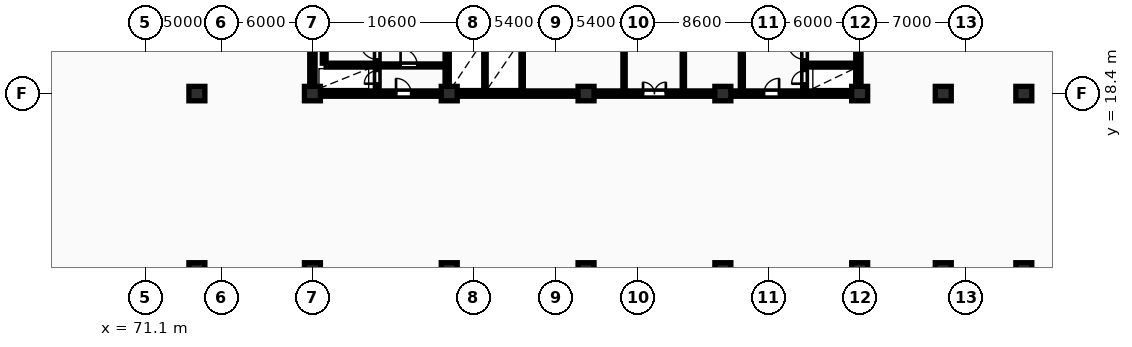
"""IFC4 building model, lengths in metres.
Left out: names, types, materials, properties, quantities, classifications, styles, units other than length and angle.
Written with IfcOpenShell. Run it as: python <this file> out.ifc"""

import sys

from ifc_helpers import new_model, si_unit, direction, frame, frame_2d, origin, origin_2d, place, context, subcontext, project, spatial, rectangle, extrude, element, fill, save


model = new_model("IFC4")
c1 = context("Model", 3, precision=1e-05, world=origin(), true_north=direction((0.0, 1.0)))
c2 = subcontext(c1, "Body", "Model", "MODEL_VIEW")
j1 = project(units=[si_unit("LENGTHUNIT", "METRE"), si_unit("PLANEANGLEUNIT", "RADIAN")], contexts=[c1])
p1 = place(None, origin())
s1 = spatial("IfcSite", under=j1, at=p1, CompositionType="ELEMENT")
p2 = place(p1, origin())
s2 = spatial("IfcBuilding", under=s1, at=p2, CompositionType="ELEMENT")
p3 = place(p2, frame((0.0, 0.0, -3.6)))
s3 = spatial("IfcBuildingStorey", under=s2, at=p3, CompositionType="ELEMENT", Elevation=-3.6)
for number, where, z_axis, x_axis in (
    (1, (74.5, 6.8, 0.0), (0.0, 0.0, 1.0), (1.0, 0.0, 0.0)),
    (2, (74.5, 18.4, 0.0), (0.0, 0.0, 1.0), (1.0, 0.0, 0.0)),
    (3, (82.1, 6.8, 0.0), (0.0, 0.0, 1.0), (1.0, 0.0, 0.0)),
    (4, (82.1, 18.4, 0.0), (0.0, 0.0, 1.0), (1.0, 0.0, 0.0)),
    (5, (91.1, 6.8, 0.0), (0.0, 0.0, 1.0), (1.0, 0.0, 0.0)),
    (6, (91.1, 18.4, 0.0), (0.0, 0.0, 1.0), (1.0, 0.0, 0.0)),
    (7, (100.1, 6.8, 0.0), (0.0, 0.0, 1.0), (1.0, 0.0, 0.0)),
    (8, (100.1, 18.4, 0.0), (0.0, 0.0, 1.0), (1.0, 0.0, 0.0)),
    (9, (109.1, 6.8, 0.0), (0.0, 0.0, 1.0), (1.0, 0.0, 0.0)),
    (10, (109.1, 18.4, 0.0), (0.0, 0.0, 1.0), (1.0, 0.0, 0.0)),
    (11, (118.1, 6.8, 0.0), (0.0, 0.0, 1.0), (1.0, 0.0, 0.0)),
    (12, (118.1, 18.4, 0.0), (0.0, 0.0, 1.0), (1.0, 0.0, 0.0)),
    (13, (123.6, 6.8, 0.0), (0.0, 0.0, 1.0), (1.0, 0.0, 0.0)),
    (14, (123.6, 18.4, 0.0), (0.0, 0.0, 1.0), (1.0, 0.0, 0.0)),
    (15, (128.9, 6.8, 0.0), (0.0, 0.0, 1.0), (1.0, 0.0, 0.0)),
    (16, (128.9, 18.4, 0.0), (0.0, 0.0, 1.0), (1.0, 0.0, 0.0)),
):
    element("IfcColumn", number, at=place(p3, frame(where, z_axis=z_axis, x_axis=x_axis)), inside=s3, PredefinedType="COLUMN", context=c2, shape_type="SweptSolid", body=[
        extrude(rectangle(XDim=1.05, YDim=0.95, at=origin_2d()), origin(), (0.0, 0.0, 1.0), 3.6),
    ])
for number, where, z_axis, x_axis in (
    (17, (82.1, 18.575, 0.0), (0.0, 0.0, 1.0), (0.0, 1.0, 0.0)),
    (18, (118.015, 18.575, 0.0), (0.0, 0.0, 1.0), (0.0, 1.0, 0.0)),
):
    element("IfcWall", number, at=place(p3, frame(where, z_axis=z_axis, x_axis=x_axis)), inside=s3, PredefinedType="SHEAR", context=c2, shape_type="SweptSolid", body=[
        extrude(rectangle(XDim=11.65, YDim=0.35, at=frame_2d((5.825, 0.0))), origin(), (0.0, 0.0, 1.0), 3.6),
    ])
p4 = place(p3, frame((81.925, 18.4, 0.0), z_axis=(0.0, 0.0, 1.0), x_axis=(1.0, 0.0, 0.0)))
e19 = element("IfcWall", 19, at=p4, inside=s3, PredefinedType="SHEAR", context=c2, shape_type="SweptSolid", body=[
    extrude(rectangle(XDim=36.265, YDim=0.35, at=frame_2d((18.132, 0.0))), origin(), (0.0, 0.0, 1.0), 3.6),
])
p5 = place(p4, frame((5.675, 0.0, 0.0)))
e20 = element("IfcOpeningElement", 20, at=p5, cuts=e19, PredefinedType="OPENING", context=c2, shape_type="SweptSolid", body=[
    extrude(rectangle(XDim=1.0, YDim=2.15, at=frame_2d((0.5, 1.075))), frame((0.0, 0.185, 0.0), z_axis=(0.0, -1.0, 0.0), x_axis=(1.0, 0.0, 0.0)), (0.0, 0.0, 1.0), 0.37),
])
p6 = place(p4, frame((21.925, 0.0, 0.0)))
e21 = element("IfcOpeningElement", 21, at=p6, cuts=e19, PredefinedType="OPENING", context=c2, shape_type="SweptSolid", body=[
    extrude(rectangle(XDim=1.5, YDim=2.2, at=frame_2d((0.75, 1.1))), frame((0.0, 0.185, 0.0), z_axis=(0.0, -1.0, 0.0), x_axis=(1.0, 0.0, 0.0)), (0.0, 0.0, 1.0), 0.37),
])
p7 = place(p4, frame((29.875, 0.0, 0.0)))
e22 = element("IfcOpeningElement", 22, at=p7, cuts=e19, PredefinedType="OPENING", context=c2, shape_type="SweptSolid", body=[
    extrude(rectangle(XDim=1.0, YDim=2.15, at=frame_2d((0.5, 1.075))), frame((0.0, 0.185, 0.0), z_axis=(0.0, -1.0, 0.0), x_axis=(1.0, 0.0, 0.0)), (0.0, 0.0, 1.0), 0.37),
])
p8 = place(p3, frame((82.875, 20.4, 0.0), z_axis=(0.0, 0.0, 1.0), x_axis=(0.0, 1.0, 0.0)))
e23 = element("IfcWall", 23, at=p8, inside=s3, PredefinedType="SHEAR", context=c2, shape_type="SweptSolid", body=[
    extrude(rectangle(XDim=7.6, YDim=0.25, at=frame_2d((3.8, 0.0))), origin(), (0.0, 0.0, 1.0), 3.6),
])
p9 = place(p3, frame((86.365, 18.6, 0.0), z_axis=(0.0, 0.0, 1.0), x_axis=(0.0, 1.0, 0.0)))
e24 = element("IfcWall", 24, at=p9, inside=s3, PredefinedType="SHEAR", context=c2, shape_type="SweptSolid", body=[
    extrude(rectangle(XDim=11.6, YDim=0.25, at=frame_2d((5.8, 0.0))), origin(), (0.0, 0.0, 1.0), 3.6),
])
p10 = place(p9, frame((0.45, 0.0, 0.0)))
e25 = element("IfcOpeningElement", 25, at=p10, cuts=e24, PredefinedType="OPENING", context=c2, shape_type="SweptSolid", body=[
    extrude(rectangle(XDim=0.85, YDim=2.05, at=frame_2d((0.425, 1.025))), frame((0.0, 0.135, 0.0), z_axis=(0.0, -1.0, 0.0), x_axis=(1.0, 0.0, 0.0)), (0.0, 0.0, 1.0), 0.27),
])
p11 = place(p9, frame((2.05, 0.0, 0.0)))
e26 = element("IfcOpeningElement", 26, at=p11, cuts=e24, PredefinedType="OPENING", context=c2, shape_type="SweptSolid", body=[
    extrude(rectangle(XDim=1.1, YDim=2.1, at=frame_2d((0.55, 1.05))), frame((0.0, 0.135, 0.0), z_axis=(0.0, -1.0, 0.0), x_axis=(1.0, 0.0, 0.0)), (0.0, 0.0, 1.0), 0.27),
])
p12 = place(p9, frame((9.95, 0.0, 0.0)))
e27 = element("IfcOpeningElement", 27, at=p12, cuts=e24, PredefinedType="OPENING", context=c2, shape_type="SweptSolid", body=[
    extrude(rectangle(XDim=0.85, YDim=2.05, at=frame_2d((0.425, 1.025))), frame((0.0, 0.135, 0.0), z_axis=(0.0, -1.0, 0.0), x_axis=(1.0, 0.0, 0.0)), (0.0, 0.0, 1.0), 0.27),
])
p13 = place(p3, frame((83.0, 20.275, 0.0), z_axis=(0.0, 0.0, 1.0), x_axis=(1.0, 0.0, 0.0)))
e28 = element("IfcWall", 28, at=p13, inside=s3, PredefinedType="SHEAR", context=c2, shape_type="SweptSolid", body=[
    extrude(rectangle(XDim=3.24, YDim=0.25, at=frame_2d((1.62, 0.0))), origin(), (0.0, 0.0, 1.0), 3.6),
])
p14 = place(p3, frame((86.5, 20.25, 0.0), z_axis=(0.0, 0.0, 1.0), x_axis=(1.0, 0.0, 0.0)))
e29 = element("IfcWall", 29, at=p14, inside=s3, PredefinedType="PARTITIONING", context=c2, shape_type="SweptSolid", body=[
    extrude(rectangle(XDim=4.32, YDim=0.2, at=frame_2d((2.16, 0.0))), origin(), (0.0, 0.0, 1.0), 3.3),
])
p15 = place(p14, frame((1.4, 0.0, 0.0)))
e30 = element("IfcOpeningElement", 30, at=p15, cuts=e29, PredefinedType="OPENING", context=c2, shape_type="SweptSolid", body=[
    extrude(rectangle(XDim=1.1, YDim=2.1, at=frame_2d((0.55, 1.05))), frame((0.0, 0.11, 0.0), z_axis=(0.0, -1.0, 0.0), x_axis=(1.0, 0.0, 0.0)), (0.0, 0.0, 1.0), 0.22),
])
p16 = place(p3, frame((90.95, 18.6, 0.0), z_axis=(0.0, 0.0, 1.0), x_axis=(0.0, 1.0, 0.0)))
e31 = element("IfcWall", 31, at=p16, inside=s3, PredefinedType="SHEAR", context=c2, shape_type="SweptSolid", body=[
    extrude(rectangle(XDim=11.6, YDim=0.25, at=frame_2d((5.8, 0.0))), origin(), (0.0, 0.0, 1.0), 3.6),
])
p17 = place(p16, frame((4.6, 0.0, 0.0)))
e32 = element("IfcOpeningElement", 32, at=p17, cuts=e31, PredefinedType="OPENING", context=c2, shape_type="SweptSolid", body=[
    extrude(rectangle(XDim=1.1, YDim=2.1, at=frame_2d((0.55, 1.05))), frame((0.0, 0.135, 0.0), z_axis=(0.0, -1.0, 0.0), x_axis=(1.0, 0.0, 0.0)), (0.0, 0.0, 1.0), 0.27),
])
for number, where, z_axis, x_axis in (
    (33, (93.45, 18.6, 0.0), (0.0, 0.0, 1.0), (0.0, 1.0, 0.0)),
    (34, (95.9, 18.6, 0.0), (0.0, 0.0, 1.0), (0.0, 1.0, 0.0)),
    (35, (102.6, 18.6, 0.0), (0.0, 0.0, 1.0), (0.0, 1.0, 0.0)),
    (36, (106.5, 18.6, 0.0), (0.0, 0.0, 1.0), (0.0, 1.0, 0.0)),
):
    element("IfcWall", number, at=place(p3, frame(where, z_axis=z_axis, x_axis=x_axis)), inside=s3, PredefinedType="PARTITIONING", context=c2, shape_type="SweptSolid", body=[
        extrude(rectangle(XDim=3.6, YDim=0.15, at=frame_2d((1.8, 0.0))), origin(), (0.0, 0.0, 1.0), 3.3),
    ])
p18 = place(p3, frame((110.35, 18.6, 0.0), z_axis=(0.0, 0.0, 1.0), x_axis=(0.0, 1.0, 0.0)))
e37 = element("IfcWall", 37, at=p18, inside=s3, PredefinedType="PARTITIONING", context=c2, shape_type="SweptSolid", body=[
    extrude(rectangle(XDim=11.6, YDim=0.2, at=frame_2d((5.8, 0.0))), origin(), (0.0, 0.0, 1.0), 3.3),
])
p19 = place(p18, frame((5.2, 0.0, 0.0)))
e38 = element("IfcOpeningElement", 38, at=p19, cuts=e37, PredefinedType="OPENING", context=c2, shape_type="SweptSolid", body=[
    extrude(rectangle(XDim=1.1, YDim=2.15, at=frame_2d((0.55, 1.075))), frame((0.0, 0.11, 0.0), z_axis=(0.0, -1.0, 0.0), x_axis=(1.0, 0.0, 0.0)), (0.0, 0.0, 1.0), 0.22),
])
p20 = place(p3, frame((114.475, 18.6, 0.0), z_axis=(0.0, 0.0, 1.0), x_axis=(0.0, 1.0, 0.0)))
e39 = element("IfcWall", 39, at=p20, inside=s3, PredefinedType="SHEAR", context=c2, shape_type="SweptSolid", body=[
    extrude(rectangle(XDim=11.6, YDim=0.25, at=frame_2d((5.8, 0.0))), origin(), (0.0, 0.0, 1.0), 3.6),
])
p21 = place(p20, frame((0.45, 0.0, 0.0)))
e40 = element("IfcOpeningElement", 40, at=p21, cuts=e39, PredefinedType="OPENING", context=c2, shape_type="SweptSolid", body=[
    extrude(rectangle(XDim=0.85, YDim=2.05, at=frame_2d((0.425, 1.025))), frame((0.0, 0.135, 0.0), z_axis=(0.0, -1.0, 0.0), x_axis=(1.0, 0.0, 0.0)), (0.0, 0.0, 1.0), 0.27),
])
p22 = place(p20, frame((2.05, 0.0, 0.0)))
e41 = element("IfcOpeningElement", 41, at=p22, cuts=e39, PredefinedType="OPENING", context=c2, shape_type="SweptSolid", body=[
    extrude(rectangle(XDim=1.1, YDim=2.1, at=frame_2d((0.55, 1.05))), frame((0.0, 0.135, 0.0), z_axis=(0.0, -1.0, 0.0), x_axis=(1.0, 0.0, 0.0)), (0.0, 0.0, 1.0), 0.27),
])
p23 = place(p20, frame((9.95, 0.0, 0.0)))
e42 = element("IfcOpeningElement", 42, at=p23, cuts=e39, PredefinedType="OPENING", context=c2, shape_type="SweptSolid", body=[
    extrude(rectangle(XDim=0.85, YDim=2.05, at=frame_2d((0.425, 1.025))), frame((0.0, 0.135, 0.0), z_axis=(0.0, -1.0, 0.0), x_axis=(1.0, 0.0, 0.0)), (0.0, 0.0, 1.0), 0.27),
])
p24 = place(p3, frame((114.6, 20.275, 0.0), z_axis=(0.0, 0.0, 1.0), x_axis=(1.0, 0.0, 0.0)))
e43 = element("IfcWall", 43, at=p24, inside=s3, PredefinedType="SHEAR", context=c2, shape_type="SweptSolid", body=[
    extrude(rectangle(XDim=3.24, YDim=0.25, at=frame_2d((1.62, 0.0))), origin(), (0.0, 0.0, 1.0), 3.6),
])
p25 = place(p5, origin())
e44 = element("IfcDoor", 44, at=p25, inside=s3, OperationType="SINGLE_SWING_LEFT", PredefinedType="DOOR", context=c2, shape_type="SweptSolid", body=[
    extrude(rectangle(XDim=1.0, YDim=2.15, at=frame_2d((0.5, 1.075))), frame((0.0, 0.025, 0.0), z_axis=(0.0, -1.0, 0.0), x_axis=(1.0, 0.0, 0.0)), (0.0, 0.0, 1.0), 0.05),
])
fill(e20, e44)
p26 = place(p6, origin())
e45 = element("IfcDoor", 45, at=p26, inside=s3, OperationType="DOUBLE_DOOR_SINGLE_SWING", PredefinedType="DOOR", context=c2, shape_type="SweptSolid", body=[
    extrude(rectangle(XDim=1.5, YDim=2.2, at=frame_2d((0.75, 1.1))), frame((0.0, 0.025, 0.0), z_axis=(0.0, -1.0, 0.0), x_axis=(1.0, 0.0, 0.0)), (0.0, 0.0, 1.0), 0.05),
])
fill(e21, e45)
p27 = place(p7, origin())
e46 = element("IfcDoor", 46, at=p27, inside=s3, OperationType="SINGLE_SWING_RIGHT", PredefinedType="DOOR", context=c2, shape_type="SweptSolid", body=[
    extrude(rectangle(XDim=1.0, YDim=2.15, at=frame_2d((0.5, 1.075))), frame((0.0, 0.025, 0.0), z_axis=(0.0, -1.0, 0.0), x_axis=(1.0, 0.0, 0.0)), (0.0, 0.0, 1.0), 0.05),
])
fill(e22, e46)
p28 = place(p10, origin())
e47 = element("IfcDoor", 47, at=p28, inside=s3, OperationType="SINGLE_SWING_LEFT", PredefinedType="DOOR", context=c2, shape_type="SweptSolid", body=[
    extrude(rectangle(XDim=0.85, YDim=2.05, at=frame_2d((0.425, 1.025))), frame((0.0, 0.025, 0.0), z_axis=(0.0, -1.0, 0.0), x_axis=(1.0, 0.0, 0.0)), (0.0, 0.0, 1.0), 0.05),
])
fill(e25, e47)
p29 = place(p11, origin())
e48 = element("IfcDoor", 48, at=p29, inside=s3, OperationType="SINGLE_SWING_RIGHT", PredefinedType="DOOR", context=c2, shape_type="SweptSolid", body=[
    extrude(rectangle(XDim=1.1, YDim=2.1, at=frame_2d((0.55, 1.05))), frame((0.0, 0.025, 0.0), z_axis=(0.0, -1.0, 0.0), x_axis=(1.0, 0.0, 0.0)), (0.0, 0.0, 1.0), 0.05),
])
fill(e26, e48)
p30 = place(p15, origin())
e49 = element("IfcDoor", 49, at=p30, inside=s3, OperationType="SINGLE_SWING_LEFT", PredefinedType="DOOR", context=c2, shape_type="SweptSolid", body=[
    extrude(rectangle(XDim=1.1, YDim=2.1, at=frame_2d((0.55, 1.05))), frame((0.0, 0.025, 0.0), z_axis=(0.0, -1.0, 0.0), x_axis=(1.0, 0.0, 0.0)), (0.0, 0.0, 1.0), 0.05),
])
fill(e30, e49)
p31 = place(p21, origin())
e50 = element("IfcDoor", 50, at=p31, inside=s3, OperationType="SINGLE_SWING_LEFT", PredefinedType="DOOR", context=c2, shape_type="SweptSolid", body=[
    extrude(rectangle(XDim=0.85, YDim=2.05, at=frame_2d((0.425, 1.025))), frame((0.0, 0.025, 0.0), z_axis=(0.0, -1.0, 0.0), x_axis=(1.0, 0.0, 0.0)), (0.0, 0.0, 1.0), 0.05),
])
fill(e40, e50)
p32 = place(p22, origin())
e51 = element("IfcDoor", 51, at=p32, inside=s3, OperationType="SINGLE_SWING_RIGHT", PredefinedType="DOOR", context=c2, shape_type="SweptSolid", body=[
    extrude(rectangle(XDim=1.1, YDim=2.1, at=frame_2d((0.55, 1.05))), frame((0.0, 0.025, 0.0), z_axis=(0.0, -1.0, 0.0), x_axis=(1.0, 0.0, 0.0)), (0.0, 0.0, 1.0), 0.05),
])
fill(e41, e51)
save(model, sys.argv[1])
